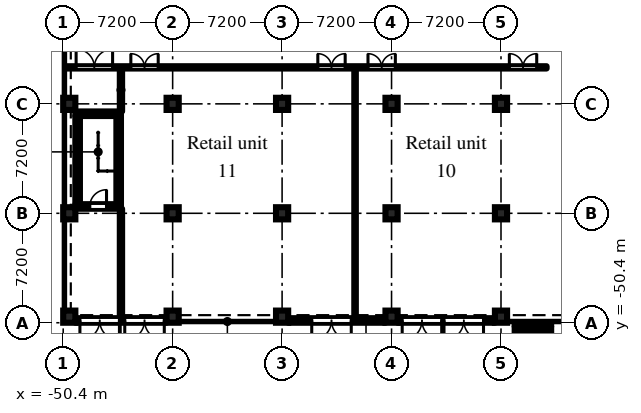
"""IFC4 building model, lengths in metres.
Left out: names, types, materials, properties, quantities, classifications, styles, units other than length and angle.
Written with IfcOpenShell. Run it as: python <this file> out.ifc"""

import sys

from ifc_helpers import new_model, si_unit, direction, frame, frame_2d, origin, origin_2d, place, context, subcontext, project, spatial, rectangle, extrude, element, fill, save


model = new_model("IFC4")
c1 = context("Model", 3, precision=1e-05, world=origin(), true_north=direction((0.0, 1.0)))
c2 = subcontext(c1, "Body", "Model", "MODEL_VIEW")
j1 = project(units=[si_unit("LENGTHUNIT", "METRE"), si_unit("PLANEANGLEUNIT", "RADIAN")], contexts=[c1])
p1 = place(None, origin())
s1 = spatial("IfcSite", under=j1, at=p1, CompositionType="ELEMENT")
p2 = place(p1, origin())
s2 = spatial("IfcBuilding", under=s1, at=p2, CompositionType="ELEMENT")
p3 = place(p2, origin())
s3 = spatial("IfcBuildingStorey", under=s2, at=p3, CompositionType="ELEMENT", Elevation=0.0)
for number, where, z_axis, x_axis in (
    (1, (-50.0, -50.0, 0.0), (0.0, 0.0, 1.0), (1.0, 0.0, 0.0)),
    (2, (-50.0, -43.2, 0.0), (0.0, 0.0, 1.0), (1.0, 0.0, 0.0)),
    (3, (-50.0, -36.0, 0.0), (0.0, 0.0, 1.0), (1.0, 0.0, 0.0)),
    (4, (-43.2, -50.0, 0.0), (0.0, 0.0, 1.0), (1.0, 0.0, 0.0)),
    (5, (-43.2, -43.2, 0.0), (0.0, 0.0, 1.0), (1.0, 0.0, 0.0)),
    (6, (-43.2, -36.0, 0.0), (0.0, 0.0, 1.0), (1.0, 0.0, 0.0)),
    (7, (-36.0, -50.0, 0.0), (0.0, 0.0, 1.0), (1.0, 0.0, 0.0)),
    (8, (-36.0, -43.2, 0.0), (0.0, 0.0, 1.0), (1.0, 0.0, 0.0)),
    (9, (-36.0, -36.0, 0.0), (0.0, 0.0, 1.0), (1.0, 0.0, 0.0)),
    (10, (-28.8, -50.0, 0.0), (0.0, 0.0, 1.0), (1.0, 0.0, 0.0)),
    (11, (-28.8, -43.2, 0.0), (0.0, 0.0, 1.0), (1.0, 0.0, 0.0)),
    (12, (-28.8, -36.0, 0.0), (0.0, 0.0, 1.0), (1.0, 0.0, 0.0)),
    (13, (-21.6, -50.0, 0.0), (0.0, 0.0, 1.0), (1.0, 0.0, 0.0)),
    (14, (-21.6, -43.2, 0.0), (0.0, 0.0, 1.0), (1.0, 0.0, 0.0)),
    (15, (-21.6, -36.0, 0.0), (0.0, 0.0, 1.0), (1.0, 0.0, 0.0)),
):
    element("IfcColumn", number, at=place(p3, frame(where, z_axis=z_axis, x_axis=x_axis)), inside=s3, PredefinedType="COLUMN", context=c2, shape_type="SweptSolid", body=[
        extrude(rectangle(XDim=0.8, YDim=0.8, at=origin_2d()), origin(), (0.0, 0.0, 1.0), 6.6),
    ])
p4 = place(p3, frame((-49.6, -50.25, 0.0), z_axis=(0.0, 0.0, 1.0), x_axis=(1.0, 0.0, 0.0)))
e16 = element("IfcWall", 16, at=p4, inside=s3, PredefinedType="SOLIDWALL", context=c2, shape_type="SweptSolid", body=[
    extrude(rectangle(XDim=6.0, YDim=0.3, at=frame_2d((3.0, 0.0))), origin(), (0.0, 0.0, 1.0), 6.6),
])
p5 = place(p4, frame((0.3, 0.0, 0.0)))
e17 = element("IfcOpeningElement", 17, at=p5, cuts=e16, PredefinedType="OPENING", context=c2, shape_type="SweptSolid", body=[
    extrude(rectangle(XDim=2.6, YDim=2.4, at=frame_2d((1.3, 1.2))), frame((0.0, 0.16, 0.0), z_axis=(0.0, -1.0, 0.0), x_axis=(1.0, 0.0, 0.0)), (0.0, 0.0, 1.0), 0.32),
])
p6 = place(p4, frame((3.25, 0.0, 0.0)))
e18 = element("IfcOpeningElement", 18, at=p6, cuts=e16, PredefinedType="OPENING", context=c2, shape_type="SweptSolid", body=[
    extrude(rectangle(XDim=2.6, YDim=2.4, at=frame_2d((1.3, 1.2))), frame((0.0, 0.16, 0.0), z_axis=(0.0, -1.0, 0.0), x_axis=(1.0, 0.0, 0.0)), (0.0, 0.0, 1.0), 0.32),
])
p7 = place(p3, frame((-35.6, -50.25, 0.0), z_axis=(0.0, 0.0, 1.0), x_axis=(1.0, 0.0, 0.0)))
e19 = element("IfcWall", 19, at=p7, inside=s3, PredefinedType="SOLIDWALL", context=c2, shape_type="SweptSolid", body=[
    extrude(rectangle(XDim=6.4, YDim=0.3, at=frame_2d((3.2, 0.0))), origin(), (0.0, 0.0, 1.0), 6.6),
])
p8 = place(p7, frame((1.55, 0.0, 0.0)))
e20 = element("IfcOpeningElement", 20, at=p8, cuts=e19, PredefinedType="OPENING", context=c2, shape_type="SweptSolid", body=[
    extrude(rectangle(XDim=2.6, YDim=2.4, at=frame_2d((1.3, 1.2))), frame((0.0, 0.16, 0.0), z_axis=(0.0, -1.0, 0.0), x_axis=(1.0, 0.0, 0.0)), (0.0, 0.0, 1.0), 0.32),
])
p9 = place(p3, frame((-28.4, -50.25, 0.0), z_axis=(0.0, 0.0, 1.0), x_axis=(1.0, 0.0, 0.0)))
e21 = element("IfcWall", 21, at=p9, inside=s3, PredefinedType="SOLIDWALL", context=c2, shape_type="SweptSolid", body=[
    extrude(rectangle(XDim=6.4, YDim=0.3, at=frame_2d((3.2, 0.0))), origin(), (0.0, 0.0, 1.0), 6.6),
])
p10 = place(p9, frame((0.3, 0.0, 0.0)))
e22 = element("IfcOpeningElement", 22, at=p10, cuts=e21, PredefinedType="OPENING", context=c2, shape_type="SweptSolid", body=[
    extrude(rectangle(XDim=2.6, YDim=2.4, at=frame_2d((1.3, 1.2))), frame((0.0, 0.16, 0.0), z_axis=(0.0, -1.0, 0.0), x_axis=(1.0, 0.0, 0.0)), (0.0, 0.0, 1.0), 0.32),
])
p11 = place(p9, frame((3.05, 0.0, 0.0)))
e23 = element("IfcOpeningElement", 23, at=p11, cuts=e21, PredefinedType="OPENING", context=c2, shape_type="SweptSolid", body=[
    extrude(rectangle(XDim=2.6, YDim=2.4, at=frame_2d((1.3, 1.2))), frame((0.0, 0.16, 0.0), z_axis=(0.0, -1.0, 0.0), x_axis=(1.0, 0.0, 0.0)), (0.0, 0.0, 1.0), 0.32),
])
p12 = place(p3, frame((-20.7, -50.525, -1.4), z_axis=(0.0, 0.0, 1.0), x_axis=(1.0, 0.0, 0.0)))
e24 = element("IfcWall", 24, at=p12, inside=s3, PredefinedType="SOLIDWALL", context=c2, shape_type="SweptSolid", body=[
    extrude(rectangle(XDim=2.4, YDim=0.25, at=frame_2d((1.2, 0.0))), origin(), (0.0, 0.0, 1.0), 8.6),
])
for number, where, z_axis, x_axis in (
    (25, (-20.575, -53.15, -1.4), (0.0, 0.0, 1.0), (0.0, 1.0, 0.0)),
    (26, (-18.425, -53.15, -1.4), (0.0, 0.0, 1.0), (0.0, 1.0, 0.0)),
):
    element("IfcWall", number, at=place(p3, frame(where, z_axis=z_axis, x_axis=x_axis)), inside=s3, PredefinedType="SOLIDWALL", context=c2, shape_type="SweptSolid", body=[
        extrude(rectangle(XDim=2.5, YDim=0.25, at=frame_2d((1.25, 0.0))), origin(), (0.0, 0.0, 1.0), 8.6),
    ])
p13 = place(p3, frame((-49.6, -36.65, 0.0), z_axis=(0.0, 0.0, 1.0), x_axis=(1.0, 0.0, 0.0)))
e27 = element("IfcWall", 27, at=p13, inside=s3, PredefinedType="SHEAR", context=c2, shape_type="SweptSolid", body=[
    extrude(rectangle(XDim=3.0, YDim=0.3, at=frame_2d((1.5, 0.0))), origin(), (0.0, 0.0, 1.0), 6.6),
])
p14 = place(p3, frame((-49.6, -42.75, 0.0), z_axis=(0.0, 0.0, 1.0), x_axis=(1.0, 0.0, 0.0)))
e28 = element("IfcWall", 28, at=p14, inside=s3, PredefinedType="SHEAR", context=c2, shape_type="SweptSolid", body=[
    extrude(rectangle(XDim=3.0, YDim=0.3, at=frame_2d((1.5, 0.0))), origin(), (0.0, 0.0, 1.0), 6.6),
])
p15 = place(p14, frame((0.95, 0.0, 0.0)))
e29 = element("IfcOpeningElement", 29, at=p15, cuts=e28, PredefinedType="OPENING", context=c2, shape_type="SweptSolid", body=[
    extrude(rectangle(XDim=1.1, YDim=2.1, at=frame_2d((0.55, 1.05))), frame((0.0, 0.16, 0.0), z_axis=(0.0, -1.0, 0.0), x_axis=(1.0, 0.0, 0.0)), (0.0, 0.0, 1.0), 0.32),
])
for number, where, z_axis, x_axis in (
    (30, (-49.45, -36.8, 0.0), (0.0, 0.0, 1.0), (0.0, -1.0, 0.0)),
    (31, (-46.75, -36.8, 0.0), (0.0, 0.0, 1.0), (0.0, -1.0, 0.0)),
):
    element("IfcWall", number, at=place(p3, frame(where, z_axis=z_axis, x_axis=x_axis)), inside=s3, PredefinedType="SHEAR", context=c2, shape_type="SweptSolid", body=[
        extrude(rectangle(XDim=5.8, YDim=0.3, at=frame_2d((2.9, 0.0))), origin(), (0.0, 0.0, 1.0), 6.6),
    ])
p16 = place(p3, frame((-50.22, -33.6, 0.0), z_axis=(0.0, 0.0, 1.0), x_axis=(1.0, 0.0, 0.0)))
e32 = element("IfcWall", 32, at=p16, inside=s3, PredefinedType="PARTITIONING", context=c2, shape_type="SweptSolid", body=[
    extrude(rectangle(XDim=31.62, YDim=0.15, at=frame_2d((15.81, 0.0))), origin(), (0.0, 0.0, 1.0), 6.6),
])
p17 = place(p16, frame((0.67, 0.0, 0.0)))
e33 = element("IfcOpeningElement", 33, at=p17, cuts=e32, PredefinedType="OPENING", context=c2, shape_type="SweptSolid", body=[
    extrude(rectangle(XDim=2.4, YDim=2.1, at=frame_2d((1.2, 1.05))), frame((0.0, 0.085, 0.0), z_axis=(0.0, -1.0, 0.0), x_axis=(1.0, 0.0, 0.0)), (0.0, 0.0, 1.0), 0.17),
])
p18 = place(p16, frame((19.87, 0.0, 0.0)))
e34 = element("IfcOpeningElement", 34, at=p18, cuts=e32, PredefinedType="OPENING", context=c2, shape_type="SweptSolid", body=[
    extrude(rectangle(XDim=1.8, YDim=2.1, at=frame_2d((0.9, 1.05))), frame((0.0, 0.085, 0.0), z_axis=(0.0, -1.0, 0.0), x_axis=(1.0, 0.0, 0.0)), (0.0, 0.0, 1.0), 0.17),
])
p19 = place(p16, frame((29.17, 0.0, 0.0)))
e35 = element("IfcOpeningElement", 35, at=p19, cuts=e32, PredefinedType="OPENING", context=c2, shape_type="SweptSolid", body=[
    extrude(rectangle(XDim=1.8, YDim=2.1, at=frame_2d((0.9, 1.05))), frame((0.0, 0.085, 0.0), z_axis=(0.0, -1.0, 0.0), x_axis=(1.0, 0.0, 0.0)), (0.0, 0.0, 1.0), 0.17),
])
p20 = place(p16, frame((4.27, 0.0, 0.0)))
e36 = element("IfcOpeningElement", 36, at=p20, cuts=e32, PredefinedType="OPENING", context=c2, shape_type="SweptSolid", body=[
    extrude(rectangle(XDim=1.8, YDim=2.1, at=frame_2d((0.9, 1.05))), frame((0.0, 0.085, 0.0), z_axis=(0.0, -1.0, 0.0), x_axis=(1.0, 0.0, 0.0)), (0.0, 0.0, 1.0), 0.17),
])
p21 = place(p16, frame((16.57, 0.0, 0.0)))
e37 = element("IfcOpeningElement", 37, at=p21, cuts=e32, PredefinedType="OPENING", context=c2, shape_type="SweptSolid", body=[
    extrude(rectangle(XDim=1.8, YDim=2.1, at=frame_2d((0.9, 1.05))), frame((0.0, 0.085, 0.0), z_axis=(0.0, -1.0, 0.0), x_axis=(1.0, 0.0, 0.0)), (0.0, 0.0, 1.0), 0.17),
])
p22 = place(p3, frame((-46.6, -50.22, 0.0), z_axis=(0.0, 0.0, 1.0), x_axis=(0.0, 1.0, 0.0)))
e38 = element("IfcWall", 38, at=p22, inside=s3, PredefinedType="PARTITIONING", context=c2, shape_type="SweptSolid", body=[
    extrude(rectangle(XDim=7.32, YDim=0.15, at=frame_2d((3.66, 0.0))), origin(), (0.0, 0.0, 1.0), 6.6),
])
p23 = place(p3, frame((-46.6, -36.5, 0.0), z_axis=(0.0, 0.0, 1.0), x_axis=(0.0, 1.0, 0.0)))
e39 = element("IfcWall", 39, at=p23, inside=s3, PredefinedType="PARTITIONING", context=c2, shape_type="SweptSolid", body=[
    extrude(rectangle(XDim=2.825, YDim=0.15, at=frame_2d((1.413, 0.0))), origin(), (0.0, 0.0, 1.0), 6.6),
])
p24 = place(p3, frame((-31.2, -50.22, 0.0), z_axis=(0.0, 0.0, 1.0), x_axis=(0.0, 1.0, 0.0)))
e40 = element("IfcWall", 40, at=p24, inside=s3, PredefinedType="PARTITIONING", context=c2, shape_type="SweptSolid", body=[
    extrude(rectangle(XDim=16.545, YDim=0.1, at=frame_2d((8.272, 0.0))), origin(), (0.0, 0.0, 1.0), 6.6),
])
p25 = place(p5, frame((2.6, 0.0, 0.0), z_axis=(0.0, 0.0, 1.0), x_axis=(-1.0, 0.0, 0.0)))
e41 = element("IfcDoor", 41, at=p25, inside=s3, OperationType="DOUBLE_DOOR_DOUBLE_SWING", PredefinedType="DOOR", context=c2, shape_type="SweptSolid", body=[
    extrude(rectangle(XDim=2.6, YDim=2.4, at=frame_2d((1.3, 1.2))), frame((0.0, 0.025, 0.0), z_axis=(0.0, -1.0, 0.0), x_axis=(1.0, 0.0, 0.0)), (0.0, 0.0, 1.0), 0.05),
])
fill(e17, e41)
p26 = place(p6, frame((2.6, 0.0, 0.0), z_axis=(0.0, 0.0, 1.0), x_axis=(-1.0, 0.0, 0.0)))
e42 = element("IfcDoor", 42, at=p26, inside=s3, OperationType="DOUBLE_DOOR_DOUBLE_SWING", PredefinedType="DOOR", context=c2, shape_type="SweptSolid", body=[
    extrude(rectangle(XDim=2.6, YDim=2.4, at=frame_2d((1.3, 1.2))), frame((0.0, 0.025, 0.0), z_axis=(0.0, -1.0, 0.0), x_axis=(1.0, 0.0, 0.0)), (0.0, 0.0, 1.0), 0.05),
])
fill(e18, e42)
p27 = place(p8, frame((2.6, 0.0, 0.0), z_axis=(0.0, 0.0, 1.0), x_axis=(-1.0, 0.0, 0.0)))
e43 = element("IfcDoor", 43, at=p27, inside=s3, OperationType="DOUBLE_DOOR_DOUBLE_SWING", PredefinedType="DOOR", context=c2, shape_type="SweptSolid", body=[
    extrude(rectangle(XDim=2.6, YDim=2.4, at=frame_2d((1.3, 1.2))), frame((0.0, 0.025, 0.0), z_axis=(0.0, -1.0, 0.0), x_axis=(1.0, 0.0, 0.0)), (0.0, 0.0, 1.0), 0.05),
])
fill(e20, e43)
p28 = place(p10, frame((2.6, 0.0, 0.0), z_axis=(0.0, 0.0, 1.0), x_axis=(-1.0, 0.0, 0.0)))
e44 = element("IfcDoor", 44, at=p28, inside=s3, OperationType="DOUBLE_DOOR_DOUBLE_SWING", PredefinedType="DOOR", context=c2, shape_type="SweptSolid", body=[
    extrude(rectangle(XDim=2.6, YDim=2.4, at=frame_2d((1.3, 1.2))), frame((0.0, 0.025, 0.0), z_axis=(0.0, -1.0, 0.0), x_axis=(1.0, 0.0, 0.0)), (0.0, 0.0, 1.0), 0.05),
])
fill(e22, e44)
p29 = place(p11, frame((2.6, 0.0, 0.0), z_axis=(0.0, 0.0, 1.0), x_axis=(-1.0, 0.0, 0.0)))
e45 = element("IfcDoor", 45, at=p29, inside=s3, OperationType="DOUBLE_DOOR_DOUBLE_SWING", PredefinedType="DOOR", context=c2, shape_type="SweptSolid", body=[
    extrude(rectangle(XDim=2.6, YDim=2.4, at=frame_2d((1.3, 1.2))), frame((0.0, 0.025, 0.0), z_axis=(0.0, -1.0, 0.0), x_axis=(1.0, 0.0, 0.0)), (0.0, 0.0, 1.0), 0.05),
])
fill(e23, e45)
p30 = place(p15, origin())
e46 = element("IfcDoor", 46, at=p30, inside=s3, OperationType="SINGLE_SWING_RIGHT", PredefinedType="DOOR", context=c2, shape_type="SweptSolid", body=[
    extrude(rectangle(XDim=1.1, YDim=2.1, at=frame_2d((0.55, 1.05))), frame((0.0, 0.025, 0.0), z_axis=(0.0, -1.0, 0.0), x_axis=(1.0, 0.0, 0.0)), (0.0, 0.0, 1.0), 0.05),
])
fill(e29, e46)
p31 = place(p17, origin())
e47 = element("IfcDoor", 47, at=p31, inside=s3, OperationType="DOUBLE_DOOR_DOUBLE_SWING", PredefinedType="DOOR", context=c2, shape_type="SweptSolid", body=[
    extrude(rectangle(XDim=2.4, YDim=2.1, at=frame_2d((1.2, 1.05))), frame((0.0, 0.025, 0.0), z_axis=(0.0, -1.0, 0.0), x_axis=(1.0, 0.0, 0.0)), (0.0, 0.0, 1.0), 0.05),
])
fill(e33, e47)
p32 = place(p18, origin())
e48 = element("IfcDoor", 48, at=p32, inside=s3, OperationType="DOUBLE_DOOR_DOUBLE_SWING", PredefinedType="DOOR", context=c2, shape_type="SweptSolid", body=[
    extrude(rectangle(XDim=1.8, YDim=2.1, at=frame_2d((0.9, 1.05))), frame((0.0, 0.025, 0.0), z_axis=(0.0, -1.0, 0.0), x_axis=(1.0, 0.0, 0.0)), (0.0, 0.0, 1.0), 0.05),
])
fill(e34, e48)
p33 = place(p19, origin())
e49 = element("IfcDoor", 49, at=p33, inside=s3, OperationType="DOUBLE_DOOR_DOUBLE_SWING", PredefinedType="DOOR", context=c2, shape_type="SweptSolid", body=[
    extrude(rectangle(XDim=1.8, YDim=2.1, at=frame_2d((0.9, 1.05))), frame((0.0, 0.025, 0.0), z_axis=(0.0, -1.0, 0.0), x_axis=(1.0, 0.0, 0.0)), (0.0, 0.0, 1.0), 0.05),
])
fill(e35, e49)
p34 = place(p20, origin())
e50 = element("IfcDoor", 50, at=p34, inside=s3, OperationType="DOUBLE_DOOR_DOUBLE_SWING", PredefinedType="DOOR", context=c2, shape_type="SweptSolid", body=[
    extrude(rectangle(XDim=1.8, YDim=2.1, at=frame_2d((0.9, 1.05))), frame((0.0, 0.025, 0.0), z_axis=(0.0, -1.0, 0.0), x_axis=(1.0, 0.0, 0.0)), (0.0, 0.0, 1.0), 0.05),
])
fill(e36, e50)
p35 = place(p21, origin())
e51 = element("IfcDoor", 51, at=p35, inside=s3, OperationType="DOUBLE_DOOR_DOUBLE_SWING", PredefinedType="DOOR", context=c2, shape_type="SweptSolid", body=[
    extrude(rectangle(XDim=1.8, YDim=2.1, at=frame_2d((0.9, 1.05))), frame((0.0, 0.025, 0.0), z_axis=(0.0, -1.0, 0.0), x_axis=(1.0, 0.0, 0.0)), (0.0, 0.0, 1.0), 0.05),
])
fill(e37, e51)
save(model, sys.argv[1])
